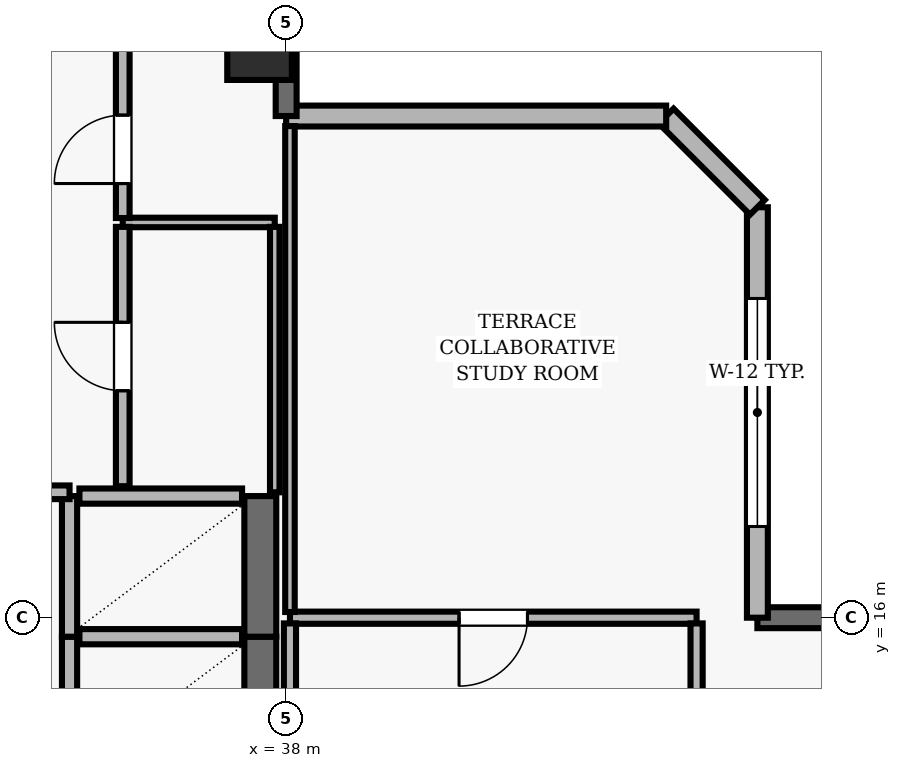
"""IFC4 building model, lengths in metres.
Left out: names, types, materials, properties, quantities, classifications, styles, units other than length and angle.
Written with IfcOpenShell. Run it as: python <this file> out.ifc"""

import sys

from ifc_helpers import new_model, si_unit, direction, frame, frame_2d, origin, origin_2d, place, context, subcontext, project, spatial, rectangle, extrude, element, fill, save


model = new_model("IFC4")
c1 = context("Model", 3, precision=1e-05, world=origin(), true_north=direction((0.0, 1.0)))
c2 = subcontext(c1, "Body", "Model", "MODEL_VIEW")
j1 = project(units=[si_unit("LENGTHUNIT", "METRE"), si_unit("PLANEANGLEUNIT", "RADIAN")], contexts=[c1])
p1 = place(None, origin())
s1 = spatial("IfcSite", under=j1, at=p1, CompositionType="ELEMENT")
p2 = place(p1, origin())
s2 = spatial("IfcBuilding", under=s1, at=p2, CompositionType="ELEMENT")
p3 = place(p2, frame((0.0, 0.0, 271.6)))
s3 = spatial("IfcBuildingStorey", under=s2, at=p3, CompositionType="ELEMENT", Elevation=271.6)
p4 = place(p3, frame((37.65, 23.5, 0.0), z_axis=(0.0, 0.0, 1.0), x_axis=(1.0, 0.0, 0.0)))
e1 = element("IfcColumn", 1, at=p4, inside=s3, PredefinedType="COLUMN", context=c2, shape_type="SweptSolid", body=[
    extrude(rectangle(XDim=0.85, YDim=0.85, at=origin_2d()), origin(), (0.0, 0.0, 1.0), 3.9),
])
p5 = place(p3, frame((57.3, 16.0, 0.0), z_axis=(0.0, 0.0, 1.0), x_axis=(-1.0, 0.0, 0.0)))
e2 = element("IfcWall", 2, at=p5, inside=s3, PredefinedType="SOLIDWALL", context=c2, shape_type="SweptSolid", body=[
    extrude(rectangle(XDim=13.1, YDim=0.275, at=frame_2d((6.55, 0.0))), origin(), (0.0, 0.0, 1.0), 3.69),
])
p6 = place(p5, frame((7.05, 0.0, 0.0)))
e3 = element("IfcOpeningElement", 3, at=p6, cuts=e2, PredefinedType="OPENING", context=c2, shape_type="SweptSolid", body=[
    extrude(rectangle(XDim=1.0, YDim=2.2, at=frame_2d((0.5, 1.1))), frame((0.0, 0.147, 0.0), z_axis=(0.0, -1.0, 0.0), x_axis=(1.0, 0.0, 0.0)), (0.0, 0.0, 1.0), 0.295),
])
p7 = place(p5, frame((2.075, 0.0, 0.9)))
e4 = element("IfcOpeningElement", 4, at=p7, cuts=e2, PredefinedType="OPENING", context=c2, shape_type="SweptSolid", body=[
    extrude(rectangle(XDim=2.4, YDim=2.2, at=frame_2d((1.2, 1.1))), frame((0.0, 0.147, 0.0), z_axis=(0.0, -1.0, 0.0), x_axis=(1.0, 0.0, 0.0)), (0.0, 0.0, 1.0), 0.295),
])
p8 = place(p3, frame((44.2, 16.0, 0.0), z_axis=(0.0, 0.0, 1.0), x_axis=(0.0, 1.0, 0.0)))
e5 = element("IfcWall", 5, at=p8, inside=s3, PredefinedType="SOLIDWALL", context=c2, shape_type="SweptSolid", body=[
    extrude(rectangle(XDim=5.4, YDim=0.275, at=frame_2d((2.7, 0.0))), origin(), (0.0, 0.0, 1.0), 3.69),
])
p9 = place(p8, frame((1.2, 0.0, 0.9)))
e6 = element("IfcOpeningElement", 6, at=p9, cuts=e5, PredefinedType="OPENING", context=c2, shape_type="SweptSolid", body=[
    extrude(rectangle(XDim=3.0, YDim=2.2, at=frame_2d((1.5, 1.1))), frame((0.0, 0.147, 0.0), z_axis=(0.0, -1.0, 0.0), x_axis=(1.0, 0.0, 0.0)), (0.0, 0.0, 1.0), 0.295),
])
p10 = place(p3, frame((44.2, 21.4, 0.0), z_axis=(0.0, 0.0, 1.0), x_axis=(-0.707034851297, 0.707178703759, 0.0)))
e7 = element("IfcWall", 7, at=p10, inside=s3, PredefinedType="SOLIDWALL", context=c2, shape_type="SweptSolid", body=[
    extrude(rectangle(XDim=1.697, YDim=0.275, at=frame_2d((0.849, 0.0))), origin(), (0.0, 0.0, 1.0), 3.69),
])
p11 = place(p3, frame((43.0, 22.6, 0.0), z_axis=(0.0, 0.0, 1.0), x_axis=(-1.0, 0.0, 0.0)))
e8 = element("IfcWall", 8, at=p11, inside=s3, PredefinedType="SOLIDWALL", context=c2, shape_type="SweptSolid", body=[
    extrude(rectangle(XDim=5.0, YDim=0.275, at=frame_2d((2.5, 0.0))), origin(), (0.0, 0.0, 1.0), 3.69),
])
p12 = place(p3, frame((38.0, 22.6, 0.0), z_axis=(0.0, 0.0, 1.0), x_axis=(0.0, 1.0, 0.0)))
e9 = element("IfcWall", 9, at=p12, inside=s3, PredefinedType="SOLIDWALL", context=c2, shape_type="SweptSolid", body=[
    extrude(rectangle(XDim=12.7, YDim=0.275, at=frame_2d((6.35, 0.0))), origin(), (0.0, 0.0, 1.0), 3.69),
])
p13 = place(p12, frame((4.85, 0.0, 0.0)))
e10 = element("IfcOpeningElement", 10, at=p13, cuts=e9, PredefinedType="OPENING", context=c2, shape_type="SweptSolid", body=[
    extrude(rectangle(XDim=1.0, YDim=2.2, at=frame_2d((0.5, 1.1))), frame((0.0, 0.147, 0.0), z_axis=(0.0, -1.0, 0.0), x_axis=(1.0, 0.0, 0.0)), (0.0, 0.0, 1.0), 0.295),
])
p14 = place(p12, frame((8.625, 0.0, 0.9)))
e11 = element("IfcOpeningElement", 11, at=p14, cuts=e9, PredefinedType="OPENING", context=c2, shape_type="SweptSolid", body=[
    extrude(rectangle(XDim=1.8, YDim=1.6, at=frame_2d((0.9, 0.8))), frame((0.0, 0.147, 0.0), z_axis=(0.0, -1.0, 0.0), x_axis=(1.0, 0.0, 0.0)), (0.0, 0.0, 1.0), 0.295),
])
p15 = place(p3, frame((35.15, 15.75, 0.0), z_axis=(0.0, 0.0, 1.0), x_axis=(0.0, -1.0, 0.0)))
e12 = element("IfcWall", 12, at=p15, inside=s3, PredefinedType="SOLIDWALL", context=c2, shape_type="SweptSolid", body=[
    extrude(rectangle(XDim=1.85, YDim=0.2, at=frame_2d((0.925, 0.0))), origin(), (0.0, 0.0, 1.0), 3.69),
])
p16 = place(p3, frame((37.66, 13.9, 0.0), z_axis=(0.0, 0.0, 1.0), x_axis=(0.0, 1.0, 0.0)))
e13 = element("IfcWall", 13, at=p16, inside=s3, PredefinedType="SHEAR", context=c2, shape_type="SweptSolid", body=[
    extrude(rectangle(XDim=1.85, YDim=0.42, at=frame_2d((0.925, 0.0))), origin(), (0.0, 0.0, 1.0), 3.69),
])
p17 = place(p3, frame((37.42, 15.75, 0.0), z_axis=(0.0, 0.0, 1.0), x_axis=(-1.0, 0.0, 0.0)))
e14 = element("IfcWall", 14, at=p17, inside=s3, PredefinedType="SOLIDWALL", context=c2, shape_type="SweptSolid", body=[
    extrude(rectangle(XDim=2.14, YDim=0.2, at=frame_2d((1.07, 0.0))), origin(), (0.0, 0.0, 1.0), 3.69),
])
p18 = place(p3, frame((35.15, 17.6, 0.0), z_axis=(0.0, 0.0, 1.0), x_axis=(0.0, -1.0, 0.0)))
e15 = element("IfcWall", 15, at=p18, inside=s3, PredefinedType="SOLIDWALL", context=c2, shape_type="SweptSolid", body=[
    extrude(rectangle(XDim=1.85, YDim=0.2, at=frame_2d((0.925, 0.0))), origin(), (0.0, 0.0, 1.0), 3.69),
])
p19 = place(p3, frame((37.66, 15.75, 0.0), z_axis=(0.0, 0.0, 1.0), x_axis=(0.0, 1.0, 0.0)))
e16 = element("IfcWall", 16, at=p19, inside=s3, PredefinedType="SHEAR", context=c2, shape_type="SweptSolid", body=[
    extrude(rectangle(XDim=1.85, YDim=0.42, at=frame_2d((0.925, 0.0))), origin(), (0.0, 0.0, 1.0), 3.69),
])
p20 = place(p3, frame((37.42, 17.6, 0.0), z_axis=(0.0, 0.0, 1.0), x_axis=(-1.0, 0.0, 0.0)))
e17 = element("IfcWall", 17, at=p20, inside=s3, PredefinedType="SOLIDWALL", context=c2, shape_type="SweptSolid", body=[
    extrude(rectangle(XDim=2.14, YDim=0.2, at=frame_2d((1.07, 0.0))), origin(), (0.0, 0.0, 1.0), 3.69),
])
p21 = place(p3, frame((33.85, 17.65, 0.0), z_axis=(0.0, 0.0, 1.0), x_axis=(1.0, 0.0, 0.0)))
e18 = element("IfcWall", 18, at=p21, inside=s3, PredefinedType="PARTITIONING", context=c2, shape_type="SweptSolid", body=[
    extrude(rectangle(XDim=1.3, YDim=0.18, at=frame_2d((0.65, 0.0))), origin(), (0.0, 0.0, 1.0), 3.69),
])
p22 = place(p3, frame((35.85, 21.2, 0.0), z_axis=(0.0, 0.0, 1.0), x_axis=(1.0, 0.0, 0.0)))
e19 = element("IfcWall", 19, at=p22, inside=s3, PredefinedType="PARTITIONING", context=c2, shape_type="SweptSolid", body=[
    extrude(rectangle(XDim=2.0, YDim=0.125, at=frame_2d((1.0, 0.0))), origin(), (0.0, 0.0, 1.0), 3.69),
])
p23 = place(p3, frame((43.4, 16.0, 0.0), z_axis=(0.0, 0.0, 1.0), x_axis=(-1.0, 0.0, 0.0)))
e20 = element("IfcWall", 20, at=p23, inside=s3, PredefinedType="PARTITIONING", context=c2, shape_type="SweptSolid", body=[
    extrude(rectangle(XDim=5.35, YDim=0.16, at=frame_2d((2.675, 0.0))), origin(), (0.0, 0.0, 1.0), 3.39),
])
p24 = place(p23, frame((2.225, 0.0, 0.0)))
e21 = element("IfcOpeningElement", 21, at=p24, cuts=e20, PredefinedType="OPENING", context=c2, shape_type="SweptSolid", body=[
    extrude(rectangle(XDim=0.9, YDim=2.1, at=frame_2d((0.45, 1.05))), frame((0.0, 0.09, 0.0), z_axis=(0.0, -1.0, 0.0), x_axis=(1.0, 0.0, 0.0)), (0.0, 0.0, 1.0), 0.18),
])
p25 = place(p3, frame((35.85, 17.73, 0.0), z_axis=(0.0, 0.0, 1.0), x_axis=(0.0, 1.0, 0.0)))
e22 = element("IfcWall", 22, at=p25, inside=s3, PredefinedType="PARTITIONING", context=c2, shape_type="SweptSolid", body=[
    extrude(rectangle(XDim=3.412, YDim=0.18, at=frame_2d((1.706, 0.0))), origin(), (0.0, 0.0, 1.0), 3.69),
])
p26 = place(p25, frame((1.256, 0.0, 0.0)))
e23 = element("IfcOpeningElement", 23, at=p26, cuts=e22, PredefinedType="OPENING", context=c2, shape_type="SweptSolid", body=[
    extrude(rectangle(XDim=0.9, YDim=2.1, at=frame_2d((0.45, 1.05))), frame((0.0, 0.1, 0.0), z_axis=(0.0, -1.0, 0.0), x_axis=(1.0, 0.0, 0.0)), (0.0, 0.0, 1.0), 0.2),
])
p27 = place(p3, frame((35.85, 21.258, 0.0), z_axis=(0.0, 0.0, 1.0), x_axis=(0.0, 1.0, 0.0)))
e24 = element("IfcWall", 24, at=p27, inside=s3, PredefinedType="PARTITIONING", context=c2, shape_type="SweptSolid", body=[
    extrude(rectangle(XDim=2.507, YDim=0.18, at=frame_2d((1.253, 0.0))), origin(), (0.0, 0.0, 1.0), 3.69),
])
p28 = place(p27, frame((0.454, 0.0, 0.0)))
e25 = element("IfcOpeningElement", 25, at=p28, cuts=e24, PredefinedType="OPENING", context=c2, shape_type="SweptSolid", body=[
    extrude(rectangle(XDim=0.9, YDim=2.1, at=frame_2d((0.45, 1.05))), frame((0.0, 0.1, 0.0), z_axis=(0.0, -1.0, 0.0), x_axis=(1.0, 0.0, 0.0)), (0.0, 0.0, 1.0), 0.2),
])
p29 = place(p3, frame((37.85, 17.65, 0.0), z_axis=(0.0, 0.0, 1.0), x_axis=(0.0, 1.0, 0.0)))
e26 = element("IfcWall", 26, at=p29, inside=s3, PredefinedType="PARTITIONING", context=c2, shape_type="SweptSolid", body=[
    extrude(rectangle(XDim=3.492, YDim=0.125, at=frame_2d((1.746, 0.0))), origin(), (0.0, 0.0, 1.0), 3.221),
])
p30 = place(p3, frame((38.05, 15.925, 0.0), z_axis=(0.0, 0.0, 1.0), x_axis=(0.0, -1.0, 0.0)))
e27 = element("IfcWall", 27, at=p30, inside=s3, PredefinedType="PARTITIONING", context=c2, shape_type="SweptSolid", body=[
    extrude(rectangle(XDim=6.375, YDim=0.16, at=frame_2d((3.188, 0.0))), origin(), (0.0, 0.0, 1.0), 3.221),
])
p31 = place(p3, frame((38.05, 22.468, 0.0), z_axis=(0.0, 0.0, 1.0), x_axis=(0.0, -1.0, 0.0)))
e28 = element("IfcWall", 28, at=p31, inside=s3, PredefinedType="PARTITIONING", context=c2, shape_type="SweptSolid", body=[
    extrude(rectangle(XDim=6.393, YDim=0.125, at=frame_2d((3.197, 0.0))), origin(), (0.0, 0.0, 1.0), 3.221),
])
p32 = place(p3, frame((43.4, 10.425, 0.0), z_axis=(0.0, 0.0, 1.0), x_axis=(0.0, 1.0, 0.0)))
e29 = element("IfcWall", 29, at=p32, inside=s3, PredefinedType="PARTITIONING", context=c2, shape_type="SweptSolid", body=[
    extrude(rectangle(XDim=5.5, YDim=0.16, at=frame_2d((2.75, 0.0))), origin(), (0.0, 0.0, 1.0), 3.69),
])
p33 = place(p32, frame((2.3, 0.0, 0.0)))
e30 = element("IfcOpeningElement", 30, at=p33, cuts=e29, PredefinedType="OPENING", context=c2, shape_type="SweptSolid", body=[
    extrude(rectangle(XDim=0.9, YDim=2.1, at=frame_2d((0.45, 1.05))), frame((0.0, 0.09, 0.0), z_axis=(0.0, -1.0, 0.0), x_axis=(1.0, 0.0, 0.0)), (0.0, 0.0, 1.0), 0.18),
])
p34 = place(p9, origin())
e31 = element("IfcWindow", 31, at=p34, inside=s3, PartitioningType="SINGLE_PANEL", PredefinedType="WINDOW", context=c2, shape_type="SweptSolid", body=[
    extrude(rectangle(XDim=3.0, YDim=2.2, at=frame_2d((1.5, 1.1))), frame((0.0, 0.03, 0.0), z_axis=(0.0, -1.0, 0.0), x_axis=(1.0, 0.0, 0.0)), (0.0, 0.0, 1.0), 0.06),
])
fill(e6, e31)
p35 = place(p28, origin())
e32 = element("IfcDoor", 32, at=p35, inside=s3, OperationType="SINGLE_SWING_LEFT", PredefinedType="DOOR", context=c2, shape_type="SweptSolid", body=[
    extrude(rectangle(XDim=0.9, YDim=2.1, at=frame_2d((0.45, 1.05))), frame((0.0, 0.025, 0.0), z_axis=(0.0, -1.0, 0.0), x_axis=(1.0, 0.0, 0.0)), (0.0, 0.0, 1.0), 0.05),
])
fill(e25, e32)
p36 = place(p26, origin())
e33 = element("IfcDoor", 33, at=p36, inside=s3, OperationType="SINGLE_SWING_RIGHT", PredefinedType="DOOR", context=c2, shape_type="SweptSolid", body=[
    extrude(rectangle(XDim=0.9, YDim=2.1, at=frame_2d((0.45, 1.05))), frame((0.0, 0.025, 0.0), z_axis=(0.0, -1.0, 0.0), x_axis=(1.0, 0.0, 0.0)), (0.0, 0.0, 1.0), 0.05),
])
fill(e23, e33)
p37 = place(p24, origin())
e34 = element("IfcDoor", 34, at=p37, inside=s3, OperationType="SINGLE_SWING_RIGHT", PredefinedType="DOOR", context=c2, shape_type="SweptSolid", body=[
    extrude(rectangle(XDim=0.9, YDim=2.1, at=frame_2d((0.45, 1.05))), frame((0.0, 0.025, 0.0), z_axis=(0.0, -1.0, 0.0), x_axis=(1.0, 0.0, 0.0)), (0.0, 0.0, 1.0), 0.05),
])
fill(e21, e34)
save(model, sys.argv[1])
